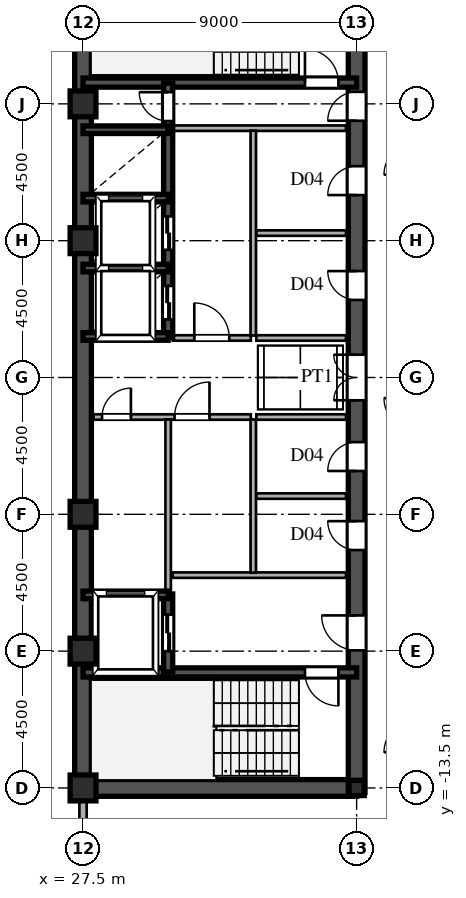
"""IFC4 building model, lengths in metres.
Left out: names, types, materials, properties, quantities, classifications, styles, units other than length and angle.
Written with IfcOpenShell. Run it as: python <this file> out.ifc"""

import sys

from ifc_helpers import new_model, si_unit, direction, frame, frame_2d, origin, origin_2d, place, context, subcontext, project, spatial, rectangle, hollow_rectangle, i_section, extrude, source, transform, mapped, element, fill, save


model = new_model("IFC4")
c1 = context("Model", 3, precision=1e-05, world=origin(), true_north=direction((0.0, 1.0)))
c2 = subcontext(c1, "Body", "Model", "MODEL_VIEW")
j1 = project(units=[si_unit("LENGTHUNIT", "METRE"), si_unit("PLANEANGLEUNIT", "RADIAN")], contexts=[c1])
p1 = place(None, origin())
s1 = spatial("IfcSite", under=j1, at=p1, CompositionType="ELEMENT")
p2 = place(p1, origin())
s2 = spatial("IfcBuilding", under=s1, at=p2, CompositionType="ELEMENT")
p3 = place(p2, frame((0.0, 0.0, 195.9)))
s3 = spatial("IfcBuildingStorey", under=s2, at=p3, CompositionType="ELEMENT", Elevation=195.9)
m1 = source(origin(), c2, "Body", "SweptSolid", [
    extrude(hollow_rectangle(XDim=0.85, YDim=0.85, WallThickness=0.036, at=origin_2d()), origin(), (0.0, 0.0, 1.0), 3.6),
])
for number, where, z_axis, x_axis in (
    (1, (27.5, -13.5, 0.0), (0.0, 0.0, 1.0), (1.0, 0.0, 0.0)),
    (2, (27.5, -9.0, 0.0), (0.0, 0.0, 1.0), (1.0, 0.0, 0.0)),
    (3, (27.5, -4.5, 0.0), (0.0, 0.0, 1.0), (1.0, 0.0, 0.0)),
    (4, (27.5, 4.5, 0.0), (0.0, 0.0, 1.0), (1.0, 0.0, 0.0)),
    (5, (27.5, 9.0, 0.0), (0.0, 0.0, 1.0), (1.0, 0.0, 0.0)),
):
    element("IfcColumn", number, at=place(p3, frame(where, z_axis=z_axis, x_axis=x_axis)), inside=s3, PredefinedType="COLUMN", context=c2, shape_type="MappedRepresentation", body=[
        mapped(m1, transform((0.0, 0.0, 0.0), scale=1.0)),
    ])
m2 = source(origin(), c2, "Body", "SweptSolid", [
    extrude(i_section(OverallWidth=0.5, OverallDepth=0.5, WebThickness=0.02, FlangeThickness=0.032, at=origin_2d()), origin(), (0.0, 0.0, 1.0), 3.6),
])
p4 = place(p3, frame((36.5, -13.5, 0.0), z_axis=(0.0, 0.0, 1.0), x_axis=(1.0, 0.0, 0.0)))
e6 = element("IfcColumn", 6, at=p4, inside=s3, PredefinedType="COLUMN", context=c2, shape_type="MappedRepresentation", body=[
    mapped(m2, transform((0.0, 0.0, 0.0), scale=1.0)),
])
p5 = place(p3, frame((27.5, -15.98, 0.0), z_axis=(0.0, 0.0, 1.0), x_axis=(0.0, 1.0, 0.0)))
e7 = element("IfcWall", 7, at=p5, inside=s3, PredefinedType="SOLIDWALL", context=c2, shape_type="SweptSolid", body=[
    extrude(rectangle(XDim=1.6, YDim=0.24, at=frame_2d((0.8, 0.0))), origin(), (0.0, 0.0, 1.0), 3.38),
])
p6 = place(p3, frame((27.5, -14.38, 0.0), z_axis=(0.0, 0.0, 1.0), x_axis=(0.0, 1.0, 0.0)))
e8 = element("IfcWall", 8, at=p6, inside=s3, PredefinedType="SOLIDWALL", context=c2, shape_type="SweptSolid", body=[
    extrude(rectangle(XDim=0.6, YDim=0.24, at=frame_2d((0.3, 0.0))), origin(), (0.0, 0.0, 1.0), 2.88),
])
for number, where, z_axis, x_axis in (
    (9, (27.5, -13.5, 0.0), (0.0, 0.0, 1.0), (0.0, 1.0, 0.0)),
    (10, (27.5, 1.3, 0.0), (0.0, 0.0, 1.0), (0.0, 1.0, 0.0)),
):
    element("IfcWall", number, at=place(p3, frame(where, z_axis=z_axis, x_axis=x_axis)), inside=s3, PredefinedType="SHEAR", context=c2, shape_type="SweptSolid", body=[
        extrude(rectangle(XDim=12.2, YDim=0.55, at=frame_2d((6.1, 0.0))), origin(), (0.0, 0.0, 1.0), 3.38),
    ])
p7 = place(p3, frame((27.5, -1.3, 0.0), z_axis=(0.0, 0.0, 1.0), x_axis=(0.0, 1.0, 0.0)))
e11 = element("IfcWall", 11, at=p7, inside=s3, PredefinedType="SHEAR", context=c2, shape_type="SweptSolid", body=[
    extrude(rectangle(XDim=2.6, YDim=0.55, at=frame_2d((1.3, 0.0))), origin(), (0.0, 0.0, 1.0), 3.38),
])
p8 = place(p3, frame((27.5, -13.5, 0.0), z_axis=(0.0, 0.0, 1.0), x_axis=(1.0, 0.0, 0.0)))
e12 = element("IfcWall", 12, at=p8, inside=s3, PredefinedType="SHEAR", context=c2, shape_type="SweptSolid", body=[
    extrude(rectangle(XDim=9.0, YDim=0.55, at=frame_2d((4.5, 0.0))), origin(), (0.0, 0.0, 1.0), 3.38),
])
p9 = place(p3, frame((36.5, -13.65, 0.0), z_axis=(0.0, 0.0, 1.0), x_axis=(0.0, 1.0, 0.0)))
e13 = element("IfcWall", 13, at=p9, inside=s3, PredefinedType="SHEAR", context=c2, shape_type="SweptSolid", body=[
    extrude(rectangle(XDim=7.15, YDim=0.55, at=frame_2d((3.575, 0.0))), origin(), (0.0, 0.0, 1.0), 3.38),
])
p10 = place(p9, frame((4.675, 0.0, 0.0)))
e14 = element("IfcOpeningElement", 14, at=p10, cuts=e13, PredefinedType="OPENING", context=c2, shape_type="SweptSolid", body=[
    extrude(rectangle(XDim=1.15, YDim=2.2, at=frame_2d((0.575, 1.1))), frame((0.0, 0.285, 0.0), z_axis=(0.0, -1.0, 0.0), x_axis=(1.0, 0.0, 0.0)), (0.0, 0.0, 1.0), 0.57),
])
p11 = place(p3, frame((36.5, -1.3, 0.0), z_axis=(0.0, 0.0, 1.0), x_axis=(0.0, 1.0, 0.0)))
e15 = element("IfcWall", 15, at=p11, inside=s3, PredefinedType="SHEAR", context=c2, shape_type="SweptSolid", body=[
    extrude(rectangle(XDim=2.6, YDim=0.55, at=frame_2d((1.3, 0.0))), origin(), (0.0, 0.0, 1.0), 3.38),
])
p12 = place(p11, frame((0.55, 0.0, 0.0)))
e16 = element("IfcOpeningElement", 16, at=p12, cuts=e15, PredefinedType="OPENING", context=c2, shape_type="SweptSolid", body=[
    extrude(rectangle(XDim=1.5, YDim=2.3, at=frame_2d((0.75, 1.15))), frame((0.0, 0.285, 0.0), z_axis=(0.0, -1.0, 0.0), x_axis=(1.0, 0.0, 0.0)), (0.0, 0.0, 1.0), 0.57),
])
p13 = place(p3, frame((36.5, 8.2, 0.0), z_axis=(0.0, 0.0, 1.0), x_axis=(0.0, 1.0, 0.0)))
e17 = element("IfcWall", 17, at=p13, inside=s3, PredefinedType="SHEAR", context=c2, shape_type="SweptSolid", body=[
    extrude(rectangle(XDim=5.45, YDim=0.55, at=frame_2d((2.725, 0.0))), origin(), (0.0, 0.0, 1.0), 3.38),
])
p14 = place(p13, frame((0.245, 0.0, 0.0)))
e18 = element("IfcOpeningElement", 18, at=p14, cuts=e17, PredefinedType="OPENING", context=c2, shape_type="SweptSolid", body=[
    extrude(rectangle(XDim=0.95, YDim=2.15, at=frame_2d((0.475, 1.075))), frame((0.0, 0.285, 0.0), z_axis=(0.0, -1.0, 0.0), x_axis=(1.0, 0.0, 0.0)), (0.0, 0.0, 1.0), 0.57),
])
p15 = place(p3, frame((36.5, -6.5, 0.0), z_axis=(0.0, 0.0, 1.0), x_axis=(0.0, 1.0, 0.0)))
e19 = element("IfcWall", 19, at=p15, inside=s3, PredefinedType="SHEAR", context=c2, shape_type="SweptSolid", body=[
    extrude(rectangle(XDim=2.6, YDim=0.55, at=frame_2d((1.3, 0.0))), origin(), (0.0, 0.0, 1.0), 3.38),
])
p16 = place(p15, frame((0.825, 0.0, 0.0)))
e20 = element("IfcOpeningElement", 20, at=p16, cuts=e19, PredefinedType="OPENING", context=c2, shape_type="SweptSolid", body=[
    extrude(rectangle(XDim=0.95, YDim=2.15, at=frame_2d((0.475, 1.075))), frame((0.0, 0.285, 0.0), z_axis=(0.0, -1.0, 0.0), x_axis=(1.0, 0.0, 0.0)), (0.0, 0.0, 1.0), 0.57),
])
p17 = place(p3, frame((36.5, -3.9, 0.0), z_axis=(0.0, 0.0, 1.0), x_axis=(0.0, 1.0, 0.0)))
e21 = element("IfcWall", 21, at=p17, inside=s3, PredefinedType="SHEAR", context=c2, shape_type="SweptSolid", body=[
    extrude(rectangle(XDim=2.6, YDim=0.55, at=frame_2d((1.3, 0.0))), origin(), (0.0, 0.0, 1.0), 3.38),
])
p18 = place(p17, frame((0.825, 0.0, 0.0)))
e22 = element("IfcOpeningElement", 22, at=p18, cuts=e21, PredefinedType="OPENING", context=c2, shape_type="SweptSolid", body=[
    extrude(rectangle(XDim=0.95, YDim=2.15, at=frame_2d((0.475, 1.075))), frame((0.0, 0.285, 0.0), z_axis=(0.0, -1.0, 0.0), x_axis=(1.0, 0.0, 0.0)), (0.0, 0.0, 1.0), 0.57),
])
p19 = place(p3, frame((36.5, 1.3, 0.0), z_axis=(0.0, 0.0, 1.0), x_axis=(0.0, 1.0, 0.0)))
e23 = element("IfcWall", 23, at=p19, inside=s3, PredefinedType="SHEAR", context=c2, shape_type="SweptSolid", body=[
    extrude(rectangle(XDim=3.45, YDim=0.55, at=frame_2d((1.725, 0.0))), origin(), (0.0, 0.0, 1.0), 3.38),
])
p20 = place(p19, frame((1.25, 0.0, 0.0)))
e24 = element("IfcOpeningElement", 24, at=p20, cuts=e23, PredefinedType="OPENING", context=c2, shape_type="SweptSolid", body=[
    extrude(rectangle(XDim=0.95, YDim=2.15, at=frame_2d((0.475, 1.075))), frame((0.0, 0.285, 0.0), z_axis=(0.0, -1.0, 0.0), x_axis=(1.0, 0.0, 0.0)), (0.0, 0.0, 1.0), 0.57),
])
p21 = place(p3, frame((36.5, 4.75, 0.0), z_axis=(0.0, 0.0, 1.0), x_axis=(0.0, 1.0, 0.0)))
e25 = element("IfcWall", 25, at=p21, inside=s3, PredefinedType="SHEAR", context=c2, shape_type="SweptSolid", body=[
    extrude(rectangle(XDim=3.45, YDim=0.55, at=frame_2d((1.725, 0.0))), origin(), (0.0, 0.0, 1.0), 3.38),
])
p22 = place(p21, frame((1.25, 0.0, 0.0)))
e26 = element("IfcOpeningElement", 26, at=p22, cuts=e25, PredefinedType="OPENING", context=c2, shape_type="SweptSolid", body=[
    extrude(rectangle(XDim=0.95, YDim=2.15, at=frame_2d((0.475, 1.075))), frame((0.0, 0.285, 0.0), z_axis=(0.0, -1.0, 0.0), x_axis=(1.0, 0.0, 0.0)), (0.0, 0.0, 1.0), 0.57),
])
p23 = place(p3, frame((27.5, -9.7, 0.0), z_axis=(0.0, 0.0, 1.0), x_axis=(1.0, 0.0, 0.0)))
e27 = element("IfcWall", 27, at=p23, inside=s3, PredefinedType="SHEAR", context=c2, shape_type="SweptSolid", body=[
    extrude(rectangle(XDim=9.0, YDim=0.3, at=frame_2d((4.5, 0.0))), origin(), (0.0, 0.0, 1.0), 3.38),
])
p24 = place(p23, frame((7.3, 0.0, 0.0)))
e28 = element("IfcOpeningElement", 28, at=p24, cuts=e27, PredefinedType="OPENING", context=c2, shape_type="SweptSolid", body=[
    extrude(rectangle(XDim=1.1, YDim=2.2, at=frame_2d((0.55, 1.1))), frame((0.0, 0.16, 0.0), z_axis=(0.0, -1.0, 0.0), x_axis=(1.0, 0.0, 0.0)), (0.0, 0.0, 1.0), 0.32),
])
p25 = place(p3, frame((27.5, 9.7, 0.0), z_axis=(0.0, 0.0, 1.0), x_axis=(1.0, 0.0, 0.0)))
e29 = element("IfcWall", 29, at=p25, inside=s3, PredefinedType="SHEAR", context=c2, shape_type="SweptSolid", body=[
    extrude(rectangle(XDim=9.0, YDim=0.3, at=frame_2d((4.5, 0.0))), origin(), (0.0, 0.0, 1.0), 3.38),
])
p26 = place(p25, frame((7.3, 0.0, 0.0)))
e30 = element("IfcOpeningElement", 30, at=p26, cuts=e29, PredefinedType="OPENING", context=c2, shape_type="SweptSolid", body=[
    extrude(rectangle(XDim=1.1, YDim=2.2, at=frame_2d((0.55, 1.1))), frame((0.0, 0.16, 0.0), z_axis=(0.0, -1.0, 0.0), x_axis=(1.0, 0.0, 0.0)), (0.0, 0.0, 1.0), 0.32),
])
for number, where, z_axis, x_axis in (
    (31, (27.5, -7.15, 0.0), (0.0, 0.0, 1.0), (1.0, 0.0, 0.0)),
    (32, (27.5, 1.35, 0.0), (0.0, 0.0, 1.0), (1.0, 0.0, 0.0)),
    (33, (27.5, 3.6, 0.0), (0.0, 0.0, 1.0), (1.0, 0.0, 0.0)),
    (34, (27.5, 5.9, 0.0), (0.0, 0.0, 1.0), (1.0, 0.0, 0.0)),
    (35, (27.5, 8.15, 0.0), (0.0, 0.0, 1.0), (1.0, 0.0, 0.0)),
):
    element("IfcWall", number, at=place(p3, frame(where, z_axis=z_axis, x_axis=x_axis)), inside=s3, PredefinedType="SHEAR", context=c2, shape_type="SweptSolid", body=[
        extrude(rectangle(XDim=2.8, YDim=0.25, at=frame_2d((1.4, 0.0))), origin(), (0.0, 0.0, 1.0), 3.38),
    ])
p27 = place(p3, frame((30.3, -9.68, 0.0), z_axis=(0.0, 0.0, 1.0), x_axis=(0.0, 1.0, 0.0)))
e36 = element("IfcWall", 36, at=p27, inside=s3, PredefinedType="SHEAR", context=c2, shape_type="SweptSolid", body=[
    extrude(rectangle(XDim=2.56, YDim=0.3, at=frame_2d((1.28, 0.0))), origin(), (0.0, 0.0, 1.0), 3.38),
])
p28 = place(p27, frame((0.68, 0.0, 0.0)))
e37 = element("IfcOpeningElement", 37, at=p28, cuts=e36, PredefinedType="OPENING", context=c2, shape_type="SweptSolid", body=[
    extrude(rectangle(XDim=1.2, YDim=2.25, at=frame_2d((0.6, 1.125))), frame((0.0, 0.16, 0.0), z_axis=(0.0, -1.0, 0.0), x_axis=(1.0, 0.0, 0.0)), (0.0, 0.0, 1.0), 0.32),
])
p29 = place(p3, frame((30.3, 1.32, 0.0), z_axis=(0.0, 0.0, 1.0), x_axis=(0.0, 1.0, 0.0)))
e38 = element("IfcWall", 38, at=p29, inside=s3, PredefinedType="SHEAR", context=c2, shape_type="SweptSolid", body=[
    extrude(rectangle(XDim=2.28, YDim=0.3, at=frame_2d((1.14, 0.0))), origin(), (0.0, 0.0, 1.0), 3.38),
])
p30 = place(p29, frame((0.59, 0.0, 0.0)))
e39 = element("IfcOpeningElement", 39, at=p30, cuts=e38, PredefinedType="OPENING", context=c2, shape_type="SweptSolid", body=[
    extrude(rectangle(XDim=1.1, YDim=2.2, at=frame_2d((0.55, 1.1))), frame((0.0, 0.16, 0.0), z_axis=(0.0, -1.0, 0.0), x_axis=(1.0, 0.0, 0.0)), (0.0, 0.0, 1.0), 0.32),
])
p31 = place(p3, frame((30.3, 3.6, 0.0), z_axis=(0.0, 0.0, 1.0), x_axis=(0.0, 1.0, 0.0)))
e40 = element("IfcWall", 40, at=p31, inside=s3, PredefinedType="SHEAR", context=c2, shape_type="SweptSolid", body=[
    extrude(rectangle(XDim=2.3, YDim=0.3, at=frame_2d((1.15, 0.0))), origin(), (0.0, 0.0, 1.0), 3.38),
])
p32 = place(p31, frame((0.6, 0.0, 0.0)))
e41 = element("IfcOpeningElement", 41, at=p32, cuts=e40, PredefinedType="OPENING", context=c2, shape_type="SweptSolid", body=[
    extrude(rectangle(XDim=1.1, YDim=2.2, at=frame_2d((0.55, 1.1))), frame((0.0, 0.16, 0.0), z_axis=(0.0, -1.0, 0.0), x_axis=(1.0, 0.0, 0.0)), (0.0, 0.0, 1.0), 0.32),
])
p33 = place(p3, frame((30.3, 5.9, 0.0), z_axis=(0.0, 0.0, 1.0), x_axis=(0.0, 1.0, 0.0)))
e42 = element("IfcWall", 42, at=p33, inside=s3, PredefinedType="SHEAR", context=c2, shape_type="SweptSolid", body=[
    extrude(rectangle(XDim=2.25, YDim=0.3, at=frame_2d((1.125, 0.0))), origin(), (0.0, 0.0, 1.0), 3.38),
])
p34 = place(p3, frame((30.3, 8.15, 0.0), z_axis=(0.0, 0.0, 1.0), x_axis=(0.0, 1.0, 0.0)))
e43 = element("IfcWall", 43, at=p34, inside=s3, PredefinedType="SHEAR", context=c2, shape_type="SweptSolid", body=[
    extrude(rectangle(XDim=1.53, YDim=0.3, at=frame_2d((0.765, 0.0))), origin(), (0.0, 0.0, 1.0), 3.38),
])
p35 = place(p34, frame((0.285, 0.0, 0.0)))
e44 = element("IfcOpeningElement", 44, at=p35, cuts=e43, PredefinedType="OPENING", context=c2, shape_type="SweptSolid", body=[
    extrude(rectangle(XDim=0.95, YDim=2.15, at=frame_2d((0.475, 1.075))), frame((0.0, 0.16, 0.0), z_axis=(0.0, -1.0, 0.0), x_axis=(1.0, 0.0, 0.0)), (0.0, 0.0, 1.0), 0.32),
])
for number, where, z_axis, x_axis in (
    (45, (30.45, -6.5, 0.0), (0.0, 0.0, 1.0), (1.0, 0.0, 0.0)),
    (46, (30.45, 8.2, 0.0), (0.0, 0.0, 1.0), (1.0, 0.0, 0.0)),
):
    element("IfcWall", number, at=place(p3, frame(where, z_axis=z_axis, x_axis=x_axis)), inside=s3, PredefinedType="PARTITIONING", context=c2, shape_type="SweptSolid", body=[
        extrude(rectangle(XDim=5.7, YDim=0.18, at=frame_2d((2.85, 0.0))), origin(), (0.0, 0.0, 1.0), 3.38),
    ])
p36 = place(p3, frame((33.1, -6.42, 0.0), z_axis=(0.0, 0.0, 1.0), x_axis=(0.0, 1.0, 0.0)))
e47 = element("IfcWall", 47, at=p36, inside=s3, PredefinedType="PARTITIONING", context=c2, shape_type="SweptSolid", body=[
    extrude(rectangle(XDim=5.04, YDim=0.18, at=frame_2d((2.52, 0.0))), origin(), (0.0, 0.0, 1.0), 3.38),
])
p37 = place(p3, frame((33.1, 1.38, 0.0), z_axis=(0.0, 0.0, 1.0), x_axis=(0.0, 1.0, 0.0)))
e48 = element("IfcWall", 48, at=p37, inside=s3, PredefinedType="PARTITIONING", context=c2, shape_type="SweptSolid", body=[
    extrude(rectangle(XDim=6.74, YDim=0.18, at=frame_2d((3.37, 0.0))), origin(), (0.0, 0.0, 1.0), 3.38),
])
p38 = place(p3, frame((27.85, -1.3, 0.0), z_axis=(0.0, 0.0, 1.0), x_axis=(1.0, 0.0, 0.0)))
e49 = element("IfcWall", 49, at=p38, inside=s3, PredefinedType="PARTITIONING", context=c2, shape_type="SweptSolid", body=[
    extrude(rectangle(XDim=2.45, YDim=0.18, at=frame_2d((1.225, 0.0))), origin(), (0.0, 0.0, 1.0), 3.38),
])
p39 = place(p38, frame((0.275, 0.0, 0.0)))
e50 = element("IfcOpeningElement", 50, at=p39, cuts=e49, PredefinedType="OPENING", context=c2, shape_type="SweptSolid", body=[
    extrude(rectangle(XDim=0.95, YDim=2.15, at=frame_2d((0.475, 1.075))), frame((0.0, 0.1, 0.0), z_axis=(0.0, -1.0, 0.0), x_axis=(1.0, 0.0, 0.0)), (0.0, 0.0, 1.0), 0.2),
])
p40 = place(p3, frame((30.3, -1.3, 0.0), z_axis=(0.0, 0.0, 1.0), x_axis=(1.0, 0.0, 0.0)))
e51 = element("IfcWall", 51, at=p40, inside=s3, PredefinedType="PARTITIONING", context=c2, shape_type="SweptSolid", body=[
    extrude(rectangle(XDim=2.72, YDim=0.18, at=frame_2d((1.36, 0.0))), origin(), (0.0, 0.0, 1.0), 3.38),
])
p41 = place(p40, frame((0.21, 0.0, 0.0)))
e52 = element("IfcOpeningElement", 52, at=p41, cuts=e51, PredefinedType="OPENING", context=c2, shape_type="SweptSolid", body=[
    extrude(rectangle(XDim=1.15, YDim=2.2, at=frame_2d((0.575, 1.1))), frame((0.0, 0.1, 0.0), z_axis=(0.0, -1.0, 0.0), x_axis=(1.0, 0.0, 0.0)), (0.0, 0.0, 1.0), 0.2),
])
p42 = place(p3, frame((30.3, -7.12, 0.0), z_axis=(0.0, 0.0, 1.0), x_axis=(0.0, 1.0, 0.0)))
e53 = element("IfcWall", 53, at=p42, inside=s3, PredefinedType="PARTITIONING", context=c2, shape_type="SweptSolid", body=[
    extrude(rectangle(XDim=5.74, YDim=0.18, at=frame_2d((2.87, 0.0))), origin(), (0.0, 0.0, 1.0), 3.38),
])
p43 = place(p3, frame((30.45, 1.3, 0.0), z_axis=(0.0, 0.0, 1.0), x_axis=(1.0, 0.0, 0.0)))
e54 = element("IfcWall", 54, at=p43, inside=s3, PredefinedType="PARTITIONING", context=c2, shape_type="SweptSolid", body=[
    extrude(rectangle(XDim=2.57, YDim=0.18, at=frame_2d((1.285, 0.0))), origin(), (0.0, 0.0, 1.0), 3.38),
])
p44 = place(p43, frame((0.71, 0.0, 0.0)))
e55 = element("IfcOpeningElement", 55, at=p44, cuts=e54, PredefinedType="OPENING", context=c2, shape_type="SweptSolid", body=[
    extrude(rectangle(XDim=1.15, YDim=2.2, at=frame_2d((0.575, 1.1))), frame((0.0, 0.1, 0.0), z_axis=(0.0, -1.0, 0.0), x_axis=(1.0, 0.0, 0.0)), (0.0, 0.0, 1.0), 0.2),
])
for number, where, z_axis, x_axis in (
    (56, (33.2, -1.3, 0.0), (0.0, 0.0, 1.0), (1.0, 0.0, 0.0)),
    (57, (33.2, 1.3, 0.0), (0.0, 0.0, 1.0), (1.0, 0.0, 0.0)),
    (58, (33.2, -3.9, 0.0), (0.0, 0.0, 1.0), (1.0, 0.0, 0.0)),
    (59, (33.2, 4.75, 0.0), (0.0, 0.0, 1.0), (1.0, 0.0, 0.0)),
):
    element("IfcWall", number, at=place(p3, frame(where, z_axis=z_axis, x_axis=x_axis)), inside=s3, PredefinedType="PARTITIONING", context=c2, shape_type="SweptSolid", body=[
        extrude(rectangle(XDim=2.95, YDim=0.18, at=frame_2d((1.475, 0.0))), origin(), (0.0, 0.0, 1.0), 3.38),
    ])
m3 = source(origin(), c2, "Body", "SweptSolid", [
    extrude(rectangle(XDim=1.15, YDim=2.2, at=frame_2d((0.575, 1.1))), frame((0.0, 0.025, 0.0), z_axis=(0.0, -1.0, 0.0), x_axis=(1.0, 0.0, 0.0)), (0.0, 0.0, 1.0), 0.05),
])
p45 = place(p10, origin())
e60 = element("IfcDoor", 60, at=p45, inside=s3, OperationType="SINGLE_SWING_RIGHT", PredefinedType="DOOR", context=c2, shape_type="MappedRepresentation", body=[
    mapped(m3, transform((0.0, 0.0, 0.0), scale=1.0)),
])
fill(e14, e60)
m4 = source(origin(), c2, "Body", "SweptSolid", [
    extrude(rectangle(XDim=1.5, YDim=2.3, at=frame_2d((0.75, 1.15))), frame((0.0, 0.025, 0.0), z_axis=(0.0, -1.0, 0.0), x_axis=(1.0, 0.0, 0.0)), (0.0, 0.0, 1.0), 0.05),
])
p46 = place(p12, origin())
e61 = element("IfcDoor", 61, at=p46, inside=s3, OperationType="DOUBLE_SWING_LEFT", PredefinedType="DOOR", context=c2, shape_type="MappedRepresentation", body=[
    mapped(m4, transform((0.0, 0.0, 0.0), scale=1.0)),
])
fill(e16, e61)
m5 = source(origin(), c2, "Body", "SweptSolid", [
    extrude(rectangle(XDim=0.95, YDim=2.15, at=frame_2d((0.475, 1.075))), frame((0.0, 0.025, 0.0), z_axis=(0.0, -1.0, 0.0), x_axis=(1.0, 0.0, 0.0)), (0.0, 0.0, 1.0), 0.05),
])
p47 = place(p14, origin())
e62 = element("IfcDoor", 62, at=p47, inside=s3, OperationType="SINGLE_SWING_LEFT", PredefinedType="DOOR", context=c2, shape_type="MappedRepresentation", body=[
    mapped(m5, transform((0.0, 0.0, 0.0), scale=1.0)),
])
fill(e18, e62)
p48 = place(p16, origin())
e63 = element("IfcDoor", 63, at=p48, inside=s3, OperationType="SINGLE_SWING_RIGHT", PredefinedType="DOOR", context=c2, shape_type="MappedRepresentation", body=[
    mapped(m5, transform((0.0, 0.0, 0.0), scale=1.0)),
])
fill(e20, e63)
p49 = place(p18, origin())
e64 = element("IfcDoor", 64, at=p49, inside=s3, OperationType="SINGLE_SWING_LEFT", PredefinedType="DOOR", context=c2, shape_type="MappedRepresentation", body=[
    mapped(m5, transform((0.0, 0.0, 0.0), scale=1.0)),
])
fill(e22, e64)
p50 = place(p20, origin())
e65 = element("IfcDoor", 65, at=p50, inside=s3, OperationType="SINGLE_SWING_RIGHT", PredefinedType="DOOR", context=c2, shape_type="MappedRepresentation", body=[
    mapped(m5, transform((0.0, 0.0, 0.0), scale=1.0)),
])
fill(e24, e65)
p51 = place(p22, origin())
e66 = element("IfcDoor", 66, at=p51, inside=s3, OperationType="SINGLE_SWING_LEFT", PredefinedType="DOOR", context=c2, shape_type="MappedRepresentation", body=[
    mapped(m5, transform((0.0, 0.0, 0.0), scale=1.0)),
])
fill(e26, e66)
m6 = source(origin(), c2, "Body", "SweptSolid", [
    extrude(rectangle(XDim=1.1, YDim=2.2, at=frame_2d((0.55, 1.1))), frame((0.0, 0.025, 0.0), z_axis=(0.0, -1.0, 0.0), x_axis=(1.0, 0.0, 0.0)), (0.0, 0.0, 1.0), 0.05),
])
p52 = place(p24, frame((1.1, 0.0, 0.0), z_axis=(0.0, 0.0, 1.0), x_axis=(-1.0, 0.0, 0.0)))
e67 = element("IfcDoor", 67, at=p52, inside=s3, OperationType="SINGLE_SWING_RIGHT", PredefinedType="DOOR", context=c2, shape_type="MappedRepresentation", body=[
    mapped(m6, transform((0.0, 0.0, 0.0), scale=1.0)),
])
fill(e28, e67)
p53 = place(p26, origin())
e68 = element("IfcDoor", 68, at=p53, inside=s3, OperationType="SINGLE_SWING_LEFT", PredefinedType="DOOR", context=c2, shape_type="MappedRepresentation", body=[
    mapped(m6, transform((0.0, 0.0, 0.0), scale=1.0)),
])
fill(e30, e68)
m7 = source(origin(), c2, "Body", "SweptSolid", [
    extrude(rectangle(XDim=1.2, YDim=2.25, at=frame_2d((0.6, 1.125))), frame((0.0, 0.025, 0.0), z_axis=(0.0, -1.0, 0.0), x_axis=(1.0, 0.0, 0.0)), (0.0, 0.0, 1.0), 0.05),
])
p54 = place(p28, origin())
e69 = element("IfcDoor", 69, at=p54, inside=s3, OperationType="DOUBLE_DOOR_SLIDING", PredefinedType="DOOR", context=c2, shape_type="MappedRepresentation", body=[
    mapped(m7, transform((0.0, 0.0, 0.0), scale=1.0)),
])
fill(e37, e69)
m8 = source(origin(), c2, "Body", "SweptSolid", [
    extrude(rectangle(XDim=1.1, YDim=2.2, at=frame_2d((0.55, 1.1))), frame((0.0, 0.025, 0.0), z_axis=(0.0, -1.0, 0.0), x_axis=(1.0, 0.0, 0.0)), (0.0, 0.0, 1.0), 0.05),
])
p55 = place(p30, origin())
e70 = element("IfcDoor", 70, at=p55, inside=s3, OperationType="DOUBLE_DOOR_SLIDING", PredefinedType="DOOR", context=c2, shape_type="MappedRepresentation", body=[
    mapped(m8, transform((0.0, 0.0, 0.0), scale=1.0)),
])
fill(e39, e70)
p56 = place(p32, origin())
e71 = element("IfcDoor", 71, at=p56, inside=s3, OperationType="DOUBLE_DOOR_SLIDING", PredefinedType="DOOR", context=c2, shape_type="MappedRepresentation", body=[
    mapped(m8, transform((0.0, 0.0, 0.0), scale=1.0)),
])
fill(e41, e71)
p57 = place(p35, origin())
e72 = element("IfcDoor", 72, at=p57, inside=s3, OperationType="SINGLE_SWING_RIGHT", PredefinedType="DOOR", context=c2, shape_type="MappedRepresentation", body=[
    mapped(m5, transform((0.0, 0.0, 0.0), scale=1.0)),
])
fill(e44, e72)
p58 = place(p39, origin())
e73 = element("IfcDoor", 73, at=p58, inside=s3, OperationType="SINGLE_SWING_RIGHT", PredefinedType="DOOR", context=c2, shape_type="MappedRepresentation", body=[
    mapped(m5, transform((0.0, 0.0, 0.0), scale=1.0)),
])
fill(e50, e73)
p59 = place(p41, origin())
e74 = element("IfcDoor", 74, at=p59, inside=s3, OperationType="SINGLE_SWING_RIGHT", PredefinedType="DOOR", context=c2, shape_type="MappedRepresentation", body=[
    mapped(m3, transform((0.0, 0.0, 0.0), scale=1.0)),
])
fill(e52, e74)
p60 = place(p44, origin())
e75 = element("IfcDoor", 75, at=p60, inside=s3, OperationType="SINGLE_SWING_LEFT", PredefinedType="DOOR", context=c2, shape_type="MappedRepresentation", body=[
    mapped(m3, transform((0.0, 0.0, 0.0), scale=1.0)),
])
fill(e55, e75)
save(model, sys.argv[1])
